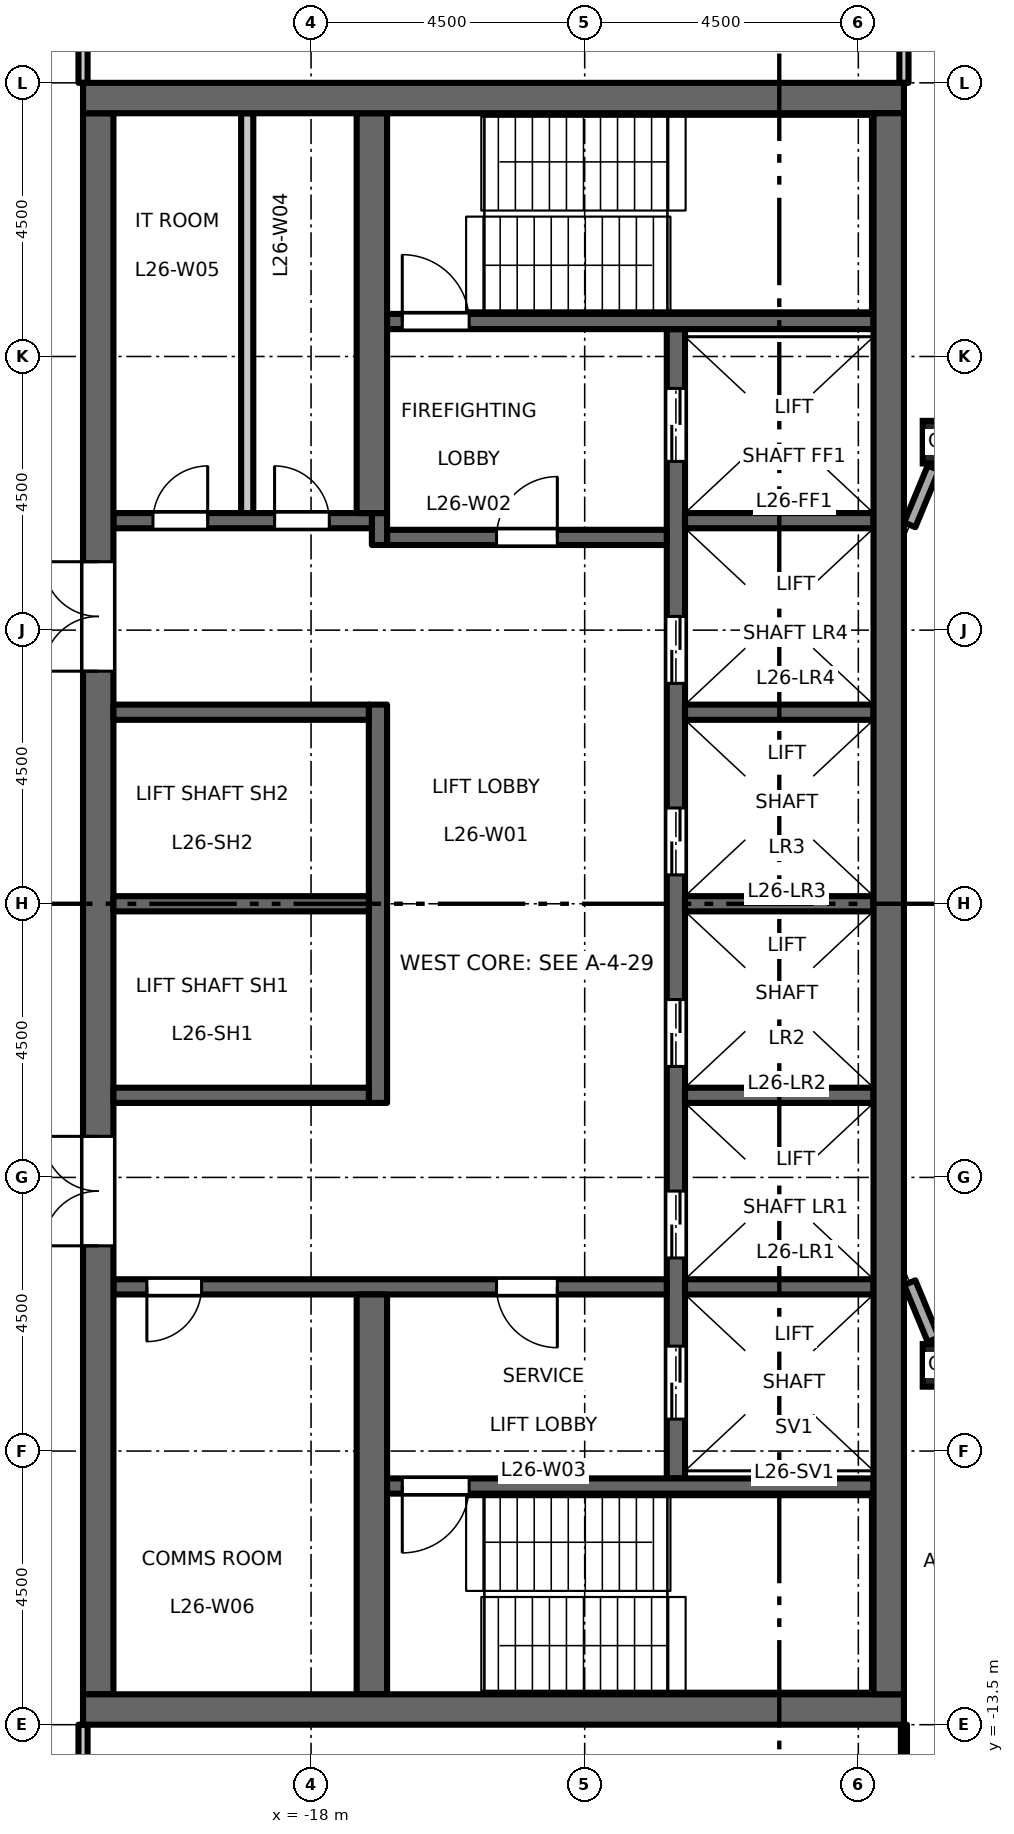
"""IFC4 building model, lengths in metres.
Left out: names, types, materials, properties, quantities, classifications, styles, units other than length and angle.
Written with IfcOpenShell. Run it as: python <this file> out.ifc"""

import sys

from ifc_helpers import new_model, si_unit, direction, frame, frame_2d, origin, origin_2d, place, context, subcontext, project, spatial, rectangle, hollow_rectangle, extrude, element, fill, save


model = new_model("IFC4")
c1 = context("Model", 3, precision=1e-05, world=origin(), true_north=direction((0.0, 1.0)))
c2 = subcontext(c1, "Body", "Model", "MODEL_VIEW")
j1 = project(units=[si_unit("LENGTHUNIT", "METRE"), si_unit("PLANEANGLEUNIT", "RADIAN")], contexts=[c1])
p1 = place(None, origin())
s1 = spatial("IfcSite", under=j1, at=p1, CompositionType="ELEMENT")
p2 = place(p1, origin())
s2 = spatial("IfcBuilding", under=s1, at=p2, CompositionType="ELEMENT")
p3 = place(p2, frame((0.0, 0.0, 122.7)))
s3 = spatial("IfcBuildingStorey", under=s2, at=p3, CompositionType="ELEMENT", Elevation=122.7)
for number, where, z_axis, x_axis in (
    (1, (-7.591, -7.591, 0.0), (0.0, 0.0, 1.0), (1.0, 0.0, 0.0)),
    (2, (-7.591, 7.591, 0.0), (0.0, 0.0, 1.0), (1.0, 0.0, 0.0)),
):
    element("IfcColumn", number, at=place(p3, frame(where, z_axis=z_axis, x_axis=x_axis)), inside=s3, PredefinedType="COLUMN", context=c2, shape_type="SweptSolid", body=[
        extrude(hollow_rectangle(XDim=0.7, YDim=0.7, WallThickness=0.04, at=origin_2d()), origin(), (0.0, 0.0, 1.0), 4.5),
    ])
p4 = place(p3, frame((-12.0, -9.45, 0.0), z_axis=(0.0, 0.0, 1.0), x_axis=(0.0, 1.0, 0.0)))
e3 = element("IfcWall", 3, at=p4, inside=s3, PredefinedType="SHEAR", context=c2, shape_type="SweptSolid", body=[
    extrude(rectangle(XDim=18.9, YDim=0.3, at=frame_2d((9.45, 0.0))), origin(), (0.0, 0.0, 1.0), 4.35),
])
p5 = place(p4, frame((3.625, 0.0, 0.0)))
e4 = element("IfcOpeningElement", 4, at=p5, cuts=e3, PredefinedType="OPENING", context=c2, shape_type="SweptSolid", body=[
    extrude(rectangle(XDim=1.1, YDim=2.1, at=frame_2d((0.55, 1.05))), frame((0.0, 0.16, 0.0), z_axis=(0.0, -1.0, 0.0), x_axis=(1.0, 0.0, 0.0)), (0.0, 0.0, 1.0), 0.32),
])
p6 = place(p4, frame((6.775, 0.0, 0.0)))
e5 = element("IfcOpeningElement", 5, at=p6, cuts=e3, PredefinedType="OPENING", context=c2, shape_type="SweptSolid", body=[
    extrude(rectangle(XDim=1.1, YDim=2.1, at=frame_2d((0.55, 1.05))), frame((0.0, 0.16, 0.0), z_axis=(0.0, -1.0, 0.0), x_axis=(1.0, 0.0, 0.0)), (0.0, 0.0, 1.0), 0.32),
])
p7 = place(p4, frame((9.925, 0.0, 0.0)))
e6 = element("IfcOpeningElement", 6, at=p7, cuts=e3, PredefinedType="OPENING", context=c2, shape_type="SweptSolid", body=[
    extrude(rectangle(XDim=1.1, YDim=2.1, at=frame_2d((0.55, 1.05))), frame((0.0, 0.16, 0.0), z_axis=(0.0, -1.0, 0.0), x_axis=(1.0, 0.0, 0.0)), (0.0, 0.0, 1.0), 0.32),
])
p8 = place(p4, frame((13.075, 0.0, 0.0)))
e7 = element("IfcOpeningElement", 7, at=p8, cuts=e3, PredefinedType="OPENING", context=c2, shape_type="SweptSolid", body=[
    extrude(rectangle(XDim=1.1, YDim=2.1, at=frame_2d((0.55, 1.05))), frame((0.0, 0.16, 0.0), z_axis=(0.0, -1.0, 0.0), x_axis=(1.0, 0.0, 0.0)), (0.0, 0.0, 1.0), 0.32),
])
p9 = place(p4, frame((16.725, 0.0, 0.0)))
e8 = element("IfcOpeningElement", 8, at=p9, cuts=e3, PredefinedType="OPENING", context=c2, shape_type="SweptSolid", body=[
    extrude(rectangle(XDim=1.2, YDim=2.1, at=frame_2d((0.6, 1.05))), frame((0.0, 0.16, 0.0), z_axis=(0.0, -1.0, 0.0), x_axis=(1.0, 0.0, 0.0)), (0.0, 0.0, 1.0), 0.32),
])
p10 = place(p4, frame((0.975, 0.0, 0.0)))
e9 = element("IfcOpeningElement", 9, at=p10, cuts=e3, PredefinedType="OPENING", context=c2, shape_type="SweptSolid", body=[
    extrude(rectangle(XDim=1.2, YDim=2.1, at=frame_2d((0.6, 1.05))), frame((0.0, 0.16, 0.0), z_axis=(0.0, -1.0, 0.0), x_axis=(1.0, 0.0, 0.0)), (0.0, 0.0, 1.0), 0.32),
])
p11 = place(p3, frame((-12.15, 6.025, 0.0), z_axis=(0.0, 0.0, 1.0), x_axis=(-1.0, 0.0, 0.0)))
e10 = element("IfcWall", 10, at=p11, inside=s3, PredefinedType="SHEAR", context=c2, shape_type="SweptSolid", body=[
    extrude(rectangle(XDim=4.6, YDim=0.25, at=frame_2d((2.3, 0.0))), origin(), (0.0, 0.0, 1.0), 4.35),
])
p12 = place(p11, frame((1.8, 0.0, 0.0)))
e11 = element("IfcOpeningElement", 11, at=p12, cuts=e10, PredefinedType="OPENING", context=c2, shape_type="SweptSolid", body=[
    extrude(rectangle(XDim=1.0, YDim=2.1, at=frame_2d((0.5, 1.05))), frame((0.0, 0.135, 0.0), z_axis=(0.0, -1.0, 0.0), x_axis=(1.0, 0.0, 0.0)), (0.0, 0.0, 1.0), 0.27),
])
p13 = place(p3, frame((-16.875, 5.9, 0.0), z_axis=(0.0, 0.0, 1.0), x_axis=(0.0, 1.0, 0.0)))
e12 = element("IfcWall", 12, at=p13, inside=s3, PredefinedType="SHEAR", context=c2, shape_type="SweptSolid", body=[
    extrude(rectangle(XDim=0.525, YDim=0.25, at=frame_2d((0.263, 0.0))), origin(), (0.0, 0.0, 1.0), 4.35),
])
p14 = place(p3, frame((-17.0, 6.3, 0.0), z_axis=(0.0, 0.0, 1.0), x_axis=(-1.0, 0.0, 0.0)))
e13 = element("IfcWall", 13, at=p14, inside=s3, PredefinedType="SHEAR", context=c2, shape_type="SweptSolid", body=[
    extrude(rectangle(XDim=4.25, YDim=0.25, at=frame_2d((2.125, 0.0))), origin(), (0.0, 0.0, 1.0), 4.35),
])
p15 = place(p14, frame((0.7, 0.0, 0.0)))
e14 = element("IfcOpeningElement", 14, at=p15, cuts=e13, PredefinedType="OPENING", context=c2, shape_type="SweptSolid", body=[
    extrude(rectangle(XDim=0.9, YDim=2.1, at=frame_2d((0.45, 1.05))), frame((0.0, 0.135, 0.0), z_axis=(0.0, -1.0, 0.0), x_axis=(1.0, 0.0, 0.0)), (0.0, 0.0, 1.0), 0.27),
])
p16 = place(p14, frame((2.7, 0.0, 0.0)))
e15 = element("IfcOpeningElement", 15, at=p16, cuts=e13, PredefinedType="OPENING", context=c2, shape_type="SweptSolid", body=[
    extrude(rectangle(XDim=0.9, YDim=2.1, at=frame_2d((0.45, 1.05))), frame((0.0, 0.135, 0.0), z_axis=(0.0, -1.0, 0.0), x_axis=(1.0, 0.0, 0.0)), (0.0, 0.0, 1.0), 0.27),
])
p17 = place(p3, frame((-12.15, -6.3, 0.0), z_axis=(0.0, 0.0, 1.0), x_axis=(-1.0, 0.0, 0.0)))
e16 = element("IfcWall", 16, at=p17, inside=s3, PredefinedType="SHEAR", context=c2, shape_type="SweptSolid", body=[
    extrude(rectangle(XDim=9.1, YDim=0.25, at=frame_2d((4.55, 0.0))), origin(), (0.0, 0.0, 1.0), 4.35),
])
p18 = place(p17, frame((1.8, 0.0, 0.0)))
e17 = element("IfcOpeningElement", 17, at=p18, cuts=e16, PredefinedType="OPENING", context=c2, shape_type="SweptSolid", body=[
    extrude(rectangle(XDim=1.0, YDim=2.1, at=frame_2d((0.5, 1.05))), frame((0.0, 0.135, 0.0), z_axis=(0.0, -1.0, 0.0), x_axis=(1.0, 0.0, 0.0)), (0.0, 0.0, 1.0), 0.27),
])
p19 = place(p17, frame((7.65, 0.0, 0.0)))
e18 = element("IfcOpeningElement", 18, at=p19, cuts=e16, PredefinedType="OPENING", context=c2, shape_type="SweptSolid", body=[
    extrude(rectangle(XDim=0.9, YDim=2.1, at=frame_2d((0.45, 1.05))), frame((0.0, 0.135, 0.0), z_axis=(0.0, -1.0, 0.0), x_axis=(1.0, 0.0, 0.0)), (0.0, 0.0, 1.0), 0.27),
])
p20 = place(p3, frame((-21.5, -13.0, 0.0), z_axis=(0.0, 0.0, 1.0), x_axis=(0.0, 1.0, 0.0)))
e19 = element("IfcWall", 19, at=p20, inside=s3, PredefinedType="SHEAR", context=c2, shape_type="SweptSolid", body=[
    extrude(rectangle(XDim=26.0, YDim=0.5, at=frame_2d((13.0, 0.0))), origin(), (0.0, 0.0, 1.0), 4.35),
])
p21 = place(p20, frame((16.825, 0.0, 0.0)))
e20 = element("IfcOpeningElement", 20, at=p21, cuts=e19, PredefinedType="OPENING", context=c2, shape_type="SweptSolid", body=[
    extrude(rectangle(XDim=1.8, YDim=2.1, at=frame_2d((0.9, 1.05))), frame((0.0, 0.26, 0.0), z_axis=(0.0, -1.0, 0.0), x_axis=(1.0, 0.0, 0.0)), (0.0, 0.0, 1.0), 0.52),
])
p22 = place(p20, frame((7.375, 0.0, 0.0)))
e21 = element("IfcOpeningElement", 21, at=p22, cuts=e19, PredefinedType="OPENING", context=c2, shape_type="SweptSolid", body=[
    extrude(rectangle(XDim=1.8, YDim=2.1, at=frame_2d((0.9, 1.05))), frame((0.0, 0.26, 0.0), z_axis=(0.0, -1.0, 0.0), x_axis=(1.0, 0.0, 0.0)), (0.0, 0.0, 1.0), 0.52),
])
p23 = place(p3, frame((-19.05, 6.425, 0.0), z_axis=(0.0, 0.0, 1.0), x_axis=(0.0, 1.0, 0.0)))
e22 = element("IfcWall", 22, at=p23, inside=s3, PredefinedType="PARTITIONING", context=c2, shape_type="SweptSolid", body=[
    extrude(rectangle(XDim=6.575, YDim=0.2, at=frame_2d((3.288, 0.0))), origin(), (0.0, 0.0, 1.0), 4.35),
])
p24 = place(p3, frame((-16.9, -3.275, 0.0), z_axis=(0.0, 0.0, 1.0), x_axis=(0.0, 1.0, 0.0)))
e23 = element("IfcWall", 23, at=p24, inside=s3, PredefinedType="SHEAR", context=c2, shape_type="SweptSolid", body=[
    extrude(rectangle(XDim=6.55, YDim=0.3, at=frame_2d((3.275, 0.0))), origin(), (0.0, 0.0, 1.0), 4.35),
])
for number, where, z_axis, x_axis in (
    (24, (-17.05, 0.0, 0.0), (0.0, 0.0, 1.0), (-1.0, 0.0, 0.0)),
    (25, (-17.05, 3.15, 0.0), (0.0, 0.0, 1.0), (-1.0, 0.0, 0.0)),
    (26, (-17.05, -3.15, 0.0), (0.0, 0.0, 1.0), (-1.0, 0.0, 0.0)),
):
    element("IfcWall", number, at=place(p3, frame(where, z_axis=z_axis, x_axis=x_axis)), inside=s3, PredefinedType="SHEAR", context=c2, shape_type="SweptSolid", body=[
        extrude(rectangle(XDim=4.2, YDim=0.25, at=frame_2d((2.1, 0.0))), origin(), (0.0, 0.0, 1.0), 4.35),
    ])
for number, where, z_axis, x_axis in (
    (27, (-17.0, 6.425, 0.0), (0.0, 0.0, 1.0), (0.0, 1.0, 0.0)),
    (28, (-17.0, -13.0, 0.0), (0.0, 0.0, 1.0), (0.0, 1.0, 0.0)),
):
    element("IfcWall", number, at=place(p3, frame(where, z_axis=z_axis, x_axis=x_axis)), inside=s3, PredefinedType="SHEAR", context=c2, shape_type="SweptSolid", body=[
        extrude(rectangle(XDim=6.575, YDim=0.5, at=frame_2d((3.288, 0.0))), origin(), (0.0, 0.0, 1.0), 4.35),
    ])
for number, where, z_axis, x_axis in (
    (29, (-8.75, 0.0, 0.0), (0.0, 0.0, 1.0), (-1.0, 0.0, 0.0)),
    (30, (-8.75, 3.15, 0.0), (0.0, 0.0, 1.0), (-1.0, 0.0, 0.0)),
    (31, (-8.75, 6.3, 0.0), (0.0, 0.0, 1.0), (-1.0, 0.0, 0.0)),
    (32, (-8.75, -3.15, 0.0), (0.0, 0.0, 1.0), (-1.0, 0.0, 0.0)),
    (33, (-8.75, -6.3, 0.0), (0.0, 0.0, 1.0), (-1.0, 0.0, 0.0)),
):
    element("IfcWall", number, at=place(p3, frame(where, z_axis=z_axis, x_axis=x_axis)), inside=s3, PredefinedType="SHEAR", context=c2, shape_type="SweptSolid", body=[
        extrude(rectangle(XDim=3.1, YDim=0.25, at=frame_2d((1.55, 0.0))), origin(), (0.0, 0.0, 1.0), 4.35),
    ])
p25 = place(p3, frame((-8.75, 9.575, 0.0), z_axis=(0.0, 0.0, 1.0), x_axis=(-1.0, 0.0, 0.0)))
e34 = element("IfcWall", 34, at=p25, inside=s3, PredefinedType="SHEAR", context=c2, shape_type="SweptSolid", body=[
    extrude(rectangle(XDim=8.0, YDim=0.25, at=frame_2d((4.0, 0.0))), origin(), (0.0, 0.0, 1.0), 4.35),
])
p26 = place(p25, frame((6.65, 0.0, 0.0)))
e35 = element("IfcOpeningElement", 35, at=p26, cuts=e34, PredefinedType="OPENING", context=c2, shape_type="SweptSolid", body=[
    extrude(rectangle(XDim=1.1, YDim=2.1, at=frame_2d((0.55, 1.05))), frame((0.0, 0.135, 0.0), z_axis=(0.0, -1.0, 0.0), x_axis=(1.0, 0.0, 0.0)), (0.0, 0.0, 1.0), 0.27),
])
p27 = place(p3, frame((-8.75, -9.575, 0.0), z_axis=(0.0, 0.0, 1.0), x_axis=(-1.0, 0.0, 0.0)))
e36 = element("IfcWall", 36, at=p27, inside=s3, PredefinedType="SHEAR", context=c2, shape_type="SweptSolid", body=[
    extrude(rectangle(XDim=8.0, YDim=0.25, at=frame_2d((4.0, 0.0))), origin(), (0.0, 0.0, 1.0), 4.35),
])
p28 = place(p27, frame((6.65, 0.0, 0.0)))
e37 = element("IfcOpeningElement", 37, at=p28, cuts=e36, PredefinedType="OPENING", context=c2, shape_type="SweptSolid", body=[
    extrude(rectangle(XDim=1.1, YDim=2.1, at=frame_2d((0.55, 1.05))), frame((0.0, 0.135, 0.0), z_axis=(0.0, -1.0, 0.0), x_axis=(1.0, 0.0, 0.0)), (0.0, 0.0, 1.0), 0.27),
])
for number, where, z_axis, x_axis in (
    (38, (-8.25, 13.25, 0.0), (0.0, 0.0, 1.0), (-1.0, 0.0, 0.0)),
    (39, (-8.25, -13.25, 0.0), (0.0, 0.0, 1.0), (-1.0, 0.0, 0.0)),
):
    element("IfcWall", number, at=place(p3, frame(where, z_axis=z_axis, x_axis=x_axis)), inside=s3, PredefinedType="SHEAR", context=c2, shape_type="SweptSolid", body=[
        extrude(rectangle(XDim=13.5, YDim=0.5, at=frame_2d((6.75, 0.0))), origin(), (0.0, 0.0, 1.0), 4.35),
    ])
p29 = place(p3, frame((-8.5, -13.0, 0.0), z_axis=(0.0, 0.0, 1.0), x_axis=(0.0, 1.0, 0.0)))
e40 = element("IfcWall", 40, at=p29, inside=s3, PredefinedType="SHEAR", context=c2, shape_type="SweptSolid", body=[
    extrude(rectangle(XDim=26.0, YDim=0.5, at=frame_2d((13.0, 0.0))), origin(), (0.0, 0.0, 1.0), 4.35),
])
for number, where, z_axis, x_axis in (
    (41, (-7.766, 7.168, 0.0), (0.0, 0.0, 1.0), (-0.383, -0.924, 0.0)),
    (42, (-8.154, -6.231, 0.0), (0.0, 0.0, 1.0), (0.383, -0.924, 0.0)),
):
    element("IfcWall", number, at=place(p3, frame(where, z_axis=z_axis, x_axis=x_axis)), inside=s3, PredefinedType="STANDARD", context=c2, shape_type="SweptSolid", body=[
        extrude(rectangle(XDim=1.015, YDim=0.2, at=frame_2d((0.507, 0.0))), origin(), (0.0, 0.0, 1.0), 3.826),
    ])
for number, where, z_axis, x_axis in (
    (43, (-21.75, -17.925, 0.0), (0.0, 0.0, 1.0), (0.0, 1.0, 0.0)),
    (44, (-21.75, 13.5, 0.0), (0.0, 0.0, 1.0), (0.0, 1.0, 0.0)),
):
    element("IfcWall", number, at=place(p3, frame(where, z_axis=z_axis, x_axis=x_axis)), inside=s3, PredefinedType="PARTITIONING", context=c2, shape_type="SweptSolid", body=[
        extrude(rectangle(XDim=4.425, YDim=0.15, at=frame_2d((2.212, 0.0))), origin(), (0.0, 0.0, 1.0), 4.35),
    ])
p30 = place(p3, frame((-8.25, -17.925, 0.0), z_axis=(0.0, 0.0, 1.0), x_axis=(0.0, 1.0, 0.0)))
e45 = element("IfcWall", 45, at=p30, inside=s3, PredefinedType="PARTITIONING", context=c2, shape_type="SweptSolid", body=[
    extrude(rectangle(XDim=4.425, YDim=0.1, at=frame_2d((2.212, 0.0))), origin(), (0.0, 0.0, 1.0), 4.35),
])
p31 = place(p3, frame((-8.25, 13.5, 0.0), z_axis=(0.0, 0.0, 1.0), x_axis=(0.0, 1.0, 0.0)))
e46 = element("IfcWall", 46, at=p31, inside=s3, PredefinedType="PARTITIONING", context=c2, shape_type="SweptSolid", body=[
    extrude(rectangle(XDim=4.425, YDim=0.15, at=frame_2d((2.212, 0.0))), origin(), (0.0, 0.0, 1.0), 4.35),
])
p32 = place(p12, origin())
e47 = element("IfcDoor", 47, at=p32, inside=s3, OperationType="SINGLE_SWING_LEFT", PredefinedType="DOOR", context=c2, shape_type="SweptSolid", body=[
    extrude(rectangle(XDim=1.0, YDim=2.1, at=frame_2d((0.5, 1.05))), frame((0.0, 0.025, 0.0), z_axis=(0.0, -1.0, 0.0), x_axis=(1.0, 0.0, 0.0)), (0.0, 0.0, 1.0), 0.05),
])
fill(e11, e47)
p33 = place(p18, origin())
e48 = element("IfcDoor", 48, at=p33, inside=s3, OperationType="SINGLE_SWING_RIGHT", PredefinedType="DOOR", context=c2, shape_type="SweptSolid", body=[
    extrude(rectangle(XDim=1.0, YDim=2.1, at=frame_2d((0.5, 1.05))), frame((0.0, 0.025, 0.0), z_axis=(0.0, -1.0, 0.0), x_axis=(1.0, 0.0, 0.0)), (0.0, 0.0, 1.0), 0.05),
])
fill(e17, e48)
p34 = place(p26, origin())
e49 = element("IfcDoor", 49, at=p34, inside=s3, OperationType="SINGLE_SWING_RIGHT", PredefinedType="DOOR", context=c2, shape_type="SweptSolid", body=[
    extrude(rectangle(XDim=1.1, YDim=2.1, at=frame_2d((0.55, 1.05))), frame((0.0, 0.025, 0.0), z_axis=(0.0, -1.0, 0.0), x_axis=(1.0, 0.0, 0.0)), (0.0, 0.0, 1.0), 0.05),
])
fill(e35, e49)
p35 = place(p28, origin())
e50 = element("IfcDoor", 50, at=p35, inside=s3, OperationType="SINGLE_SWING_LEFT", PredefinedType="DOOR", context=c2, shape_type="SweptSolid", body=[
    extrude(rectangle(XDim=1.1, YDim=2.1, at=frame_2d((0.55, 1.05))), frame((0.0, 0.025, 0.0), z_axis=(0.0, -1.0, 0.0), x_axis=(1.0, 0.0, 0.0)), (0.0, 0.0, 1.0), 0.05),
])
fill(e37, e50)
p36 = place(p21, origin())
e51 = element("IfcDoor", 51, at=p36, inside=s3, OperationType="DOUBLE_DOOR_DOUBLE_SWING", PredefinedType="DOOR", context=c2, shape_type="SweptSolid", body=[
    extrude(rectangle(XDim=1.8, YDim=2.1, at=frame_2d((0.9, 1.05))), frame((0.0, 0.025, 0.0), z_axis=(0.0, -1.0, 0.0), x_axis=(1.0, 0.0, 0.0)), (0.0, 0.0, 1.0), 0.05),
])
fill(e20, e51)
p37 = place(p22, origin())
e52 = element("IfcDoor", 52, at=p37, inside=s3, OperationType="DOUBLE_DOOR_DOUBLE_SWING", PredefinedType="DOOR", context=c2, shape_type="SweptSolid", body=[
    extrude(rectangle(XDim=1.8, YDim=2.1, at=frame_2d((0.9, 1.05))), frame((0.0, 0.025, 0.0), z_axis=(0.0, -1.0, 0.0), x_axis=(1.0, 0.0, 0.0)), (0.0, 0.0, 1.0), 0.05),
])
fill(e21, e52)
p38 = place(p5, origin())
e53 = element("IfcDoor", 53, at=p38, inside=s3, OperationType="DOUBLE_DOOR_SLIDING", PredefinedType="DOOR", context=c2, shape_type="SweptSolid", body=[
    extrude(rectangle(XDim=1.1, YDim=2.1, at=frame_2d((0.55, 1.05))), frame((0.0, 0.025, 0.0), z_axis=(0.0, -1.0, 0.0), x_axis=(1.0, 0.0, 0.0)), (0.0, 0.0, 1.0), 0.05),
])
fill(e4, e53)
p39 = place(p6, origin())
e54 = element("IfcDoor", 54, at=p39, inside=s3, OperationType="DOUBLE_DOOR_SLIDING", PredefinedType="DOOR", context=c2, shape_type="SweptSolid", body=[
    extrude(rectangle(XDim=1.1, YDim=2.1, at=frame_2d((0.55, 1.05))), frame((0.0, 0.025, 0.0), z_axis=(0.0, -1.0, 0.0), x_axis=(1.0, 0.0, 0.0)), (0.0, 0.0, 1.0), 0.05),
])
fill(e5, e54)
p40 = place(p7, origin())
e55 = element("IfcDoor", 55, at=p40, inside=s3, OperationType="DOUBLE_DOOR_SLIDING", PredefinedType="DOOR", context=c2, shape_type="SweptSolid", body=[
    extrude(rectangle(XDim=1.1, YDim=2.1, at=frame_2d((0.55, 1.05))), frame((0.0, 0.025, 0.0), z_axis=(0.0, -1.0, 0.0), x_axis=(1.0, 0.0, 0.0)), (0.0, 0.0, 1.0), 0.05),
])
fill(e6, e55)
p41 = place(p8, origin())
e56 = element("IfcDoor", 56, at=p41, inside=s3, OperationType="DOUBLE_DOOR_SLIDING", PredefinedType="DOOR", context=c2, shape_type="SweptSolid", body=[
    extrude(rectangle(XDim=1.1, YDim=2.1, at=frame_2d((0.55, 1.05))), frame((0.0, 0.025, 0.0), z_axis=(0.0, -1.0, 0.0), x_axis=(1.0, 0.0, 0.0)), (0.0, 0.0, 1.0), 0.05),
])
fill(e7, e56)
p42 = place(p9, origin())
e57 = element("IfcDoor", 57, at=p42, inside=s3, OperationType="DOUBLE_DOOR_SLIDING", PredefinedType="DOOR", context=c2, shape_type="SweptSolid", body=[
    extrude(rectangle(XDim=1.2, YDim=2.1, at=frame_2d((0.6, 1.05))), frame((0.0, 0.025, 0.0), z_axis=(0.0, -1.0, 0.0), x_axis=(1.0, 0.0, 0.0)), (0.0, 0.0, 1.0), 0.05),
])
fill(e8, e57)
p43 = place(p10, origin())
e58 = element("IfcDoor", 58, at=p43, inside=s3, OperationType="DOUBLE_DOOR_SLIDING", PredefinedType="DOOR", context=c2, shape_type="SweptSolid", body=[
    extrude(rectangle(XDim=1.2, YDim=2.1, at=frame_2d((0.6, 1.05))), frame((0.0, 0.025, 0.0), z_axis=(0.0, -1.0, 0.0), x_axis=(1.0, 0.0, 0.0)), (0.0, 0.0, 1.0), 0.05),
])
fill(e9, e58)
p44 = place(p15, origin())
e59 = element("IfcDoor", 59, at=p44, inside=s3, OperationType="SINGLE_SWING_RIGHT", PredefinedType="DOOR", context=c2, shape_type="SweptSolid", body=[
    extrude(rectangle(XDim=0.9, YDim=2.1, at=frame_2d((0.45, 1.05))), frame((0.0, 0.025, 0.0), z_axis=(0.0, -1.0, 0.0), x_axis=(1.0, 0.0, 0.0)), (0.0, 0.0, 1.0), 0.05),
])
fill(e14, e59)
p45 = place(p16, origin())
e60 = element("IfcDoor", 60, at=p45, inside=s3, OperationType="SINGLE_SWING_LEFT", PredefinedType="DOOR", context=c2, shape_type="SweptSolid", body=[
    extrude(rectangle(XDim=0.9, YDim=2.1, at=frame_2d((0.45, 1.05))), frame((0.0, 0.025, 0.0), z_axis=(0.0, -1.0, 0.0), x_axis=(1.0, 0.0, 0.0)), (0.0, 0.0, 1.0), 0.05),
])
fill(e15, e60)
p46 = place(p19, origin())
e61 = element("IfcDoor", 61, at=p46, inside=s3, OperationType="SINGLE_SWING_LEFT", PredefinedType="DOOR", context=c2, shape_type="SweptSolid", body=[
    extrude(rectangle(XDim=0.9, YDim=2.1, at=frame_2d((0.45, 1.05))), frame((0.0, 0.025, 0.0), z_axis=(0.0, -1.0, 0.0), x_axis=(1.0, 0.0, 0.0)), (0.0, 0.0, 1.0), 0.05),
])
fill(e18, e61)
save(model, sys.argv[1])
